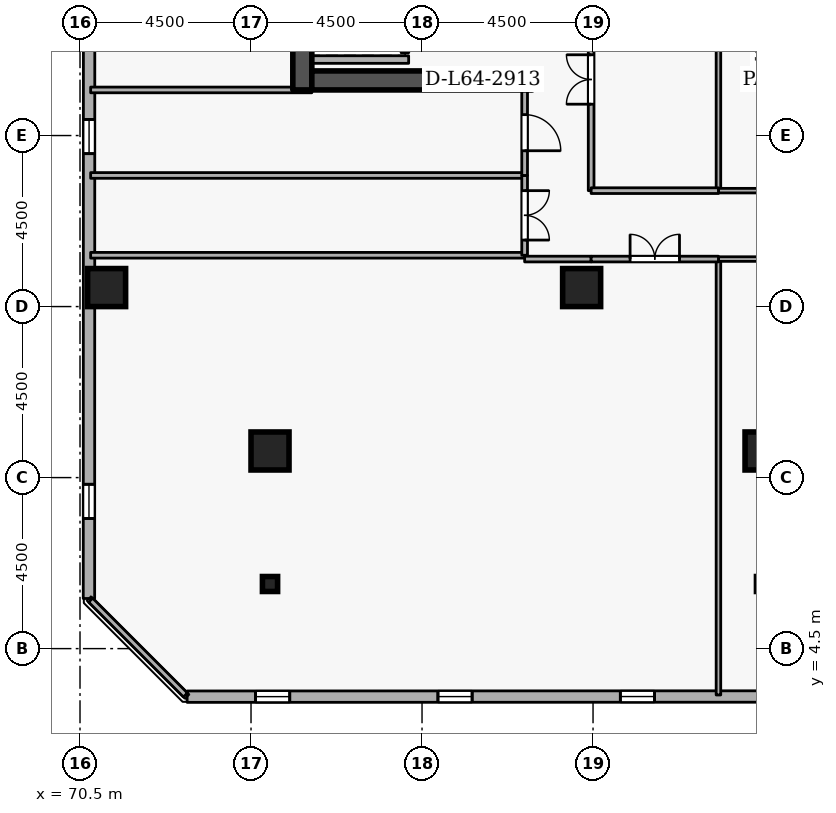
"""IFC4 building model, lengths in metres.
Left out: names, types, materials, properties, quantities, classifications, styles, units other than length and angle.
Written with IfcOpenShell. Run it as: python <this file> out.ifc"""

import sys

from ifc_helpers import new_model, si_unit, direction, frame, frame_2d, origin, origin_2d, place, context, subcontext, project, spatial, rectangle, i_section, extrude, element, fill, save


model = new_model("IFC4")
c1 = context("Model", 3, precision=1e-05, world=origin(), true_north=direction((0.0, 1.0)))
c2 = subcontext(c1, "Body", "Model", "MODEL_VIEW")
j1 = project(units=[si_unit("LENGTHUNIT", "METRE"), si_unit("PLANEANGLEUNIT", "RADIAN")], contexts=[c1])
p1 = place(None, origin())
s1 = spatial("IfcSite", under=j1, at=p1, CompositionType="ELEMENT")
p2 = place(p1, origin())
s2 = spatial("IfcBuilding", under=s1, at=p2, CompositionType="ELEMENT")
p3 = place(p2, frame((0.0, 0.0, 240.3)))
s3 = spatial("IfcBuildingStorey", under=s2, at=p3, CompositionType="ELEMENT", Elevation=240.3)
p4 = place(p3, frame((76.35, 19.2, 0.0), z_axis=(0.0, 0.0, 1.0), x_axis=(0.0, 1.0, 0.0)))
e1 = element("IfcWall", 1, at=p4, inside=s3, PredefinedType="SHEAR", context=c2, shape_type="SweptSolid", body=[
    extrude(rectangle(XDim=15.6, YDim=0.5, at=frame_2d((7.8, 0.0))), origin(), (0.0, 0.0, 1.0), 3.6),
])
p5 = place(p3, frame((76.6, 19.45, 0.0), z_axis=(0.0, 0.0, 1.0), x_axis=(1.0, 0.0, 0.0)))
e2 = element("IfcWall", 2, at=p5, inside=s3, PredefinedType="SHEAR", context=c2, shape_type="SweptSolid", body=[
    extrude(rectangle(XDim=5.8, YDim=0.5, at=frame_2d((2.9, 0.0))), origin(), (0.0, 0.0, 1.0), 3.6),
])
for number, where, z_axis, x_axis in (
    (3, (71.2, 14.0, 0.0), (0.0, 0.0, 1.0), (1.0, 0.0, 0.0)),
    (4, (88.5, 9.7, 0.0), (0.0, 0.0, 1.0), (1.0, 0.0, 0.0)),
    (5, (75.5, 9.7, 0.0), (0.0, 0.0, 1.0), (1.0, 0.0, 0.0)),
    (6, (83.7, 14.0, 0.0), (0.0, 0.0, 1.0), (1.0, 0.0, 0.0)),
):
    element("IfcColumn", number, at=place(p3, frame(where, z_axis=z_axis, x_axis=x_axis)), inside=s3, PredefinedType="COLUMN", context=c2, shape_type="SweptSolid", body=[
        extrude(rectangle(XDim=1.0, YDim=1.0, at=origin_2d()), origin(), (0.0, 0.0, 1.0), 3.6),
    ])
p6 = place(p3, frame((75.5, 6.2, 0.0), z_axis=(0.0, 0.0, 1.0), x_axis=(1.0, 0.0, 0.0)))
e7 = element("IfcColumn", 7, at=p6, inside=s3, PredefinedType="COLUMN", context=c2, shape_type="SweptSolid", body=[
    extrude(i_section(OverallWidth=0.399, OverallDepth=0.394, WebThickness=0.023, FlangeThickness=0.037, FilletRadius=0.015, at=origin_2d()), origin(), (0.0, 0.0, 1.0), 3.6),
])
p7 = place(p3, frame((73.319, 3.235, 0.0), z_axis=(0.0, 0.0, 1.0), x_axis=(0.999999963872, 0.000268805477, 0.0)))
e8 = element("IfcWall", 8, at=p7, inside=s3, PredefinedType="STANDARD", context=c2, shape_type="SweptSolid", body=[
    extrude(rectangle(XDim=33.605, YDim=0.3, at=frame_2d((16.802, 0.0))), origin(), (0.0, 0.0, 1.0), 2.7),
])
p8 = place(p7, frame((1.8, 0.0, 0.72)))
e9 = element("IfcOpeningElement", 9, at=p8, cuts=e8, PredefinedType="OPENING", context=c2, shape_type="SweptSolid", body=[
    extrude(rectangle(XDim=0.9, YDim=1.75, at=frame_2d((0.45, 0.875))), frame((0.0, 0.16, 0.0), z_axis=(0.0, -1.0, 0.0), x_axis=(1.0, 0.0, 0.0)), (0.0, 0.0, 1.0), 0.32),
])
p9 = place(p7, frame((6.6, 0.0, 0.72)))
e10 = element("IfcOpeningElement", 10, at=p9, cuts=e8, PredefinedType="OPENING", context=c2, shape_type="SweptSolid", body=[
    extrude(rectangle(XDim=0.9, YDim=1.75, at=frame_2d((0.45, 0.875))), frame((0.0, 0.16, 0.0), z_axis=(0.0, -1.0, 0.0), x_axis=(1.0, 0.0, 0.0)), (0.0, 0.0, 1.0), 0.32),
])
p10 = place(p7, frame((11.4, 0.0, 0.72)))
e11 = element("IfcOpeningElement", 11, at=p10, cuts=e8, PredefinedType="OPENING", context=c2, shape_type="SweptSolid", body=[
    extrude(rectangle(XDim=0.9, YDim=1.75, at=frame_2d((0.45, 0.875))), frame((0.0, 0.16, 0.0), z_axis=(0.0, -1.0, 0.0), x_axis=(1.0, 0.0, 0.0)), (0.0, 0.0, 1.0), 0.32),
])
p11 = place(p7, frame((16.2, 0.0, 0.72)))
e12 = element("IfcOpeningElement", 12, at=p11, cuts=e8, PredefinedType="OPENING", context=c2, shape_type="SweptSolid", body=[
    extrude(rectangle(XDim=0.9, YDim=1.75, at=frame_2d((0.45, 0.875))), frame((0.0, 0.16, 0.0), z_axis=(0.0, -1.0, 0.0), x_axis=(1.0, 0.0, 0.0)), (0.0, 0.0, 1.0), 0.32),
])
p12 = place(p7, frame((21.0, 0.0, 0.72)))
e13 = element("IfcOpeningElement", 13, at=p12, cuts=e8, PredefinedType="OPENING", context=c2, shape_type="SweptSolid", body=[
    extrude(rectangle(XDim=0.9, YDim=1.75, at=frame_2d((0.45, 0.875))), frame((0.0, 0.16, 0.0), z_axis=(0.0, -1.0, 0.0), x_axis=(1.0, 0.0, 0.0)), (0.0, 0.0, 1.0), 0.32),
])
p13 = place(p7, frame((25.8, 0.0, 0.72)))
e14 = element("IfcOpeningElement", 14, at=p13, cuts=e8, PredefinedType="OPENING", context=c2, shape_type="SweptSolid", body=[
    extrude(rectangle(XDim=0.9, YDim=1.75, at=frame_2d((0.45, 0.875))), frame((0.0, 0.16, 0.0), z_axis=(0.0, -1.0, 0.0), x_axis=(1.0, 0.0, 0.0)), (0.0, 0.0, 1.0), 0.32),
])
p14 = place(p7, frame((30.6, 0.0, 0.72)))
e15 = element("IfcOpeningElement", 15, at=p14, cuts=e8, PredefinedType="OPENING", context=c2, shape_type="SweptSolid", body=[
    extrude(rectangle(XDim=0.9, YDim=1.75, at=frame_2d((0.45, 0.875))), frame((0.0, 0.16, 0.0), z_axis=(0.0, -1.0, 0.0), x_axis=(1.0, 0.0, 0.0)), (0.0, 0.0, 1.0), 0.32),
])
p15 = place(p3, frame((70.744, 39.424, 0.0), z_axis=(0.0, 0.0, 1.0), x_axis=(-0.000268805477, -0.999999963872, 0.0)))
e16 = element("IfcWall", 16, at=p15, inside=s3, PredefinedType="STANDARD", context=c2, shape_type="SweptSolid", body=[
    extrude(rectangle(XDim=33.605, YDim=0.3, at=frame_2d((16.802, 0.0))), origin(), (0.0, 0.0, 1.0), 2.7),
])
p16 = place(p15, frame((6.6, 0.0, 0.72)))
e17 = element("IfcOpeningElement", 17, at=p16, cuts=e16, PredefinedType="OPENING", context=c2, shape_type="SweptSolid", body=[
    extrude(rectangle(XDim=0.9, YDim=1.75, at=frame_2d((0.45, 0.875))), frame((0.0, 0.16, 0.0), z_axis=(0.0, -1.0, 0.0), x_axis=(1.0, 0.0, 0.0)), (0.0, 0.0, 1.0), 0.32),
])
p17 = place(p15, frame((16.2, 0.0, 0.72)))
e18 = element("IfcOpeningElement", 18, at=p17, cuts=e16, PredefinedType="OPENING", context=c2, shape_type="SweptSolid", body=[
    extrude(rectangle(XDim=0.9, YDim=1.75, at=frame_2d((0.45, 0.875))), frame((0.0, 0.16, 0.0), z_axis=(0.0, -1.0, 0.0), x_axis=(1.0, 0.0, 0.0)), (0.0, 0.0, 1.0), 0.32),
])
p18 = place(p15, frame((21.0, 0.0, 0.72)))
e19 = element("IfcOpeningElement", 19, at=p18, cuts=e16, PredefinedType="OPENING", context=c2, shape_type="SweptSolid", body=[
    extrude(rectangle(XDim=0.9, YDim=1.75, at=frame_2d((0.45, 0.875))), frame((0.0, 0.16, 0.0), z_axis=(0.0, -1.0, 0.0), x_axis=(1.0, 0.0, 0.0)), (0.0, 0.0, 1.0), 0.32),
])
p19 = place(p15, frame((30.6, 0.0, 0.72)))
e20 = element("IfcOpeningElement", 20, at=p19, cuts=e16, PredefinedType="OPENING", context=c2, shape_type="SweptSolid", body=[
    extrude(rectangle(XDim=0.9, YDim=1.75, at=frame_2d((0.45, 0.875))), frame((0.0, 0.16, 0.0), z_axis=(0.0, -1.0, 0.0), x_axis=(1.0, 0.0, 0.0)), (0.0, 0.0, 1.0), 0.32),
])
p20 = place(p3, frame((79.05, 20.18, 0.0), z_axis=(0.0, 0.0, 1.0), x_axis=(0.0, 1.0, 0.0)))
e21 = element("IfcWall", 21, at=p20, inside=s3, PredefinedType="STANDARD", context=c2, shape_type="SweptSolid", body=[
    extrude(rectangle(XDim=1.94, YDim=0.2, at=frame_2d((0.97, 0.0))), origin(), (0.0, 0.0, 1.0), 3.34),
])
p21 = place(p20, frame((0.46, 0.0, 0.0)))
e22 = element("IfcOpeningElement", 22, at=p21, cuts=e21, PredefinedType="OPENING", context=c2, shape_type="SweptSolid", body=[
    extrude(rectangle(XDim=1.02, YDim=2.06, at=frame_2d((0.51, 1.03))), frame((0.0, 0.11, 0.0), z_axis=(0.0, -1.0, 0.0), x_axis=(1.0, 0.0, 0.0)), (0.0, 0.0, 1.0), 0.22),
])
p22 = place(p3, frame((76.612, 20.0, 0.0), z_axis=(0.0, 0.0, 1.0), x_axis=(1.0, 0.0, 0.0)))
e23 = element("IfcWall", 23, at=p22, inside=s3, PredefinedType="STANDARD", context=c2, shape_type="SweptSolid", body=[
    extrude(rectangle(XDim=2.536, YDim=0.2, at=frame_2d((1.268, 0.0))), origin(), (0.0, 0.0, 1.0), 3.34),
])
for number, where, z_axis, x_axis in (
    (24, (82.2, 14.85, 0.0), (0.0, 0.0, 1.0), (-1.0, 0.0, 0.0)),
    (25, (70.78, 16.95, 0.0), (0.0, 0.0, 1.0), (1.0, 0.0, 0.0)),
):
    element("IfcWall", number, at=place(p3, frame(where, z_axis=z_axis, x_axis=x_axis)), inside=s3, PredefinedType="PARTITIONING", context=c2, shape_type="SweptSolid", body=[
        extrude(rectangle(XDim=11.42, YDim=0.15, at=frame_2d((5.71, 0.0))), origin(), (0.0, 0.0, 1.0), 3.34),
    ])
p23 = place(p3, frame((82.2, 16.95, 0.0), z_axis=(0.0, 0.0, 1.0), x_axis=(0.0, -1.0, 0.0)))
e26 = element("IfcWall", 26, at=p23, inside=s3, PredefinedType="PARTITIONING", context=c2, shape_type="SweptSolid", body=[
    extrude(rectangle(XDim=2.1, YDim=0.15, at=frame_2d((1.05, 0.0))), origin(), (0.0, 0.0, 1.0), 3.34),
])
p24 = place(p23, frame((0.4, 0.0, 0.0)))
e27 = element("IfcOpeningElement", 27, at=p24, cuts=e26, PredefinedType="OPENING", context=c2, shape_type="SweptSolid", body=[
    extrude(rectangle(XDim=1.3, YDim=2.12, at=frame_2d((0.65, 1.06))), frame((0.0, 0.085, 0.0), z_axis=(0.0, -1.0, 0.0), x_axis=(1.0, 0.0, 0.0)), (0.0, 0.0, 1.0), 0.17),
])
p25 = place(p3, frame((70.78, 19.2, 0.0), z_axis=(0.0, 0.0, 1.0), x_axis=(1.0, 0.0, 0.0)))
e28 = element("IfcWall", 28, at=p25, inside=s3, PredefinedType="PARTITIONING", context=c2, shape_type="SweptSolid", body=[
    extrude(rectangle(XDim=5.82, YDim=0.15, at=frame_2d((2.91, 0.0))), origin(), (0.0, 0.0, 1.0), 2.545),
])
p26 = place(p3, frame((82.2, 19.2, 0.0), z_axis=(0.0, 0.0, 1.0), x_axis=(0.0, -1.0, 0.0)))
e29 = element("IfcWall", 29, at=p26, inside=s3, PredefinedType="PARTITIONING", context=c2, shape_type="SweptSolid", body=[
    extrude(rectangle(XDim=2.25, YDim=0.15, at=frame_2d((1.125, 0.0))), origin(), (0.0, 0.0, 1.0), 3.34),
])
p27 = place(p26, frame((0.65, 0.0, 0.0)))
e30 = element("IfcOpeningElement", 30, at=p27, cuts=e29, PredefinedType="OPENING", context=c2, shape_type="SweptSolid", body=[
    extrude(rectangle(XDim=0.95, YDim=2.1, at=frame_2d((0.475, 1.05))), frame((0.0, 0.085, 0.0), z_axis=(0.0, -1.0, 0.0), x_axis=(1.0, 0.0, 0.0)), (0.0, 0.0, 1.0), 0.17),
])
p28 = place(p3, frame((87.3, 3.28, 0.0), z_axis=(0.0, 0.0, 1.0), x_axis=(0.0, 1.0, 0.0)))
e31 = element("IfcWall", 31, at=p28, inside=s3, PredefinedType="PARTITIONING", context=c2, shape_type="SweptSolid", body=[
    extrude(rectangle(XDim=11.47, YDim=0.12, at=frame_2d((5.735, 0.0))), origin(), (0.0, 0.0, 1.0), 3.34),
])
p29 = place(p3, frame((87.3, 14.75, 0.0), z_axis=(0.0, 0.0, 1.0), x_axis=(1.0, 0.0, 0.0)))
e32 = element("IfcWall", 32, at=p29, inside=s3, PredefinedType="PARTITIONING", context=c2, shape_type="SweptSolid", body=[
    extrude(rectangle(XDim=5.75, YDim=0.12, at=frame_2d((2.875, 0.0))), origin(), (0.0, 0.0, 1.0), 3.34),
])
p30 = place(p29, frame((2.35, 0.0, 0.0)))
e33 = element("IfcOpeningElement", 33, at=p30, cuts=e32, PredefinedType="OPENING", context=c2, shape_type="SweptSolid", body=[
    extrude(rectangle(XDim=1.05, YDim=2.1, at=frame_2d((0.525, 1.05))), frame((0.0, 0.07, 0.0), z_axis=(0.0, -1.0, 0.0), x_axis=(1.0, 0.0, 0.0)), (0.0, 0.0, 1.0), 0.14),
])
p31 = place(p3, frame((73.275, 3.28, 0.0), z_axis=(0.0, 0.0, 1.0), x_axis=(-0.707106781187, 0.707106781187, 0.0)))
e34 = element("IfcWall", 34, at=p31, inside=s3, PredefinedType="PARTITIONING", context=c2, shape_type="SweptSolid", body=[
    extrude(rectangle(XDim=3.528, YDim=0.15, at=frame_2d((1.764, 0.0))), origin(), (0.0, 0.0, 1.0), 3.34),
])
p32 = place(p3, frame((82.2, 14.75, 0.0), z_axis=(0.0, 0.0, 1.0), x_axis=(1.0, 0.0, 0.0)))
e35 = element("IfcWall", 35, at=p32, inside=s3, PredefinedType="PARTITIONING", context=c2, shape_type="SweptSolid", body=[
    extrude(rectangle(XDim=1.75, YDim=0.15, at=frame_2d((0.875, 0.0))), origin(), (0.0, 0.0, 1.0), 3.34),
])
p33 = place(p3, frame((83.95, 14.75, 0.0), z_axis=(0.0, 0.0, 1.0), x_axis=(1.0, 0.0, 0.0)))
e36 = element("IfcWall", 36, at=p33, inside=s3, PredefinedType="PARTITIONING", context=c2, shape_type="SweptSolid", body=[
    extrude(rectangle(XDim=3.35, YDim=0.15, at=frame_2d((1.675, 0.0))), origin(), (0.0, 0.0, 1.0), 3.34),
])
p34 = place(p33, frame((1.025, 0.0, 0.0)))
e37 = element("IfcOpeningElement", 37, at=p34, cuts=e36, PredefinedType="OPENING", context=c2, shape_type="SweptSolid", body=[
    extrude(rectangle(XDim=1.3, YDim=2.12, at=frame_2d((0.65, 1.06))), frame((0.0, 0.085, 0.0), z_axis=(0.0, -1.0, 0.0), x_axis=(1.0, 0.0, 0.0)), (0.0, 0.0, 1.0), 0.17),
])
p35 = place(p3, frame((87.3, 16.55, 0.0), z_axis=(0.0, 0.0, 1.0), x_axis=(0.0, 1.0, 0.0)))
e38 = element("IfcWall", 38, at=p35, inside=s3, PredefinedType="PARTITIONING", context=c2, shape_type="SweptSolid", body=[
    extrude(rectangle(XDim=5.85, YDim=0.12, at=frame_2d((2.925, 0.0))), origin(), (0.0, 0.0, 1.0), 3.34),
])
p36 = place(p3, frame((93.05, 16.55, 0.0), z_axis=(0.0, 0.0, 1.0), x_axis=(-1.0, 0.0, 0.0)))
e39 = element("IfcWall", 39, at=p36, inside=s3, PredefinedType="PARTITIONING", context=c2, shape_type="SweptSolid", body=[
    extrude(rectangle(XDim=5.75, YDim=0.12, at=frame_2d((2.875, 0.0))), origin(), (0.0, 0.0, 1.0), 3.34),
])
p37 = place(p3, frame((83.95, 16.55, 0.0), z_axis=(0.0, 0.0, 1.0), x_axis=(0.0, 1.0, 0.0)))
e40 = element("IfcWall", 40, at=p37, inside=s3, PredefinedType="PARTITIONING", context=c2, shape_type="SweptSolid", body=[
    extrude(rectangle(XDim=5.85, YDim=0.15, at=frame_2d((2.925, 0.0))), origin(), (0.0, 0.0, 1.0), 3.34),
])
p38 = place(p37, frame((2.275, 0.0, 0.0)))
e41 = element("IfcOpeningElement", 41, at=p38, cuts=e40, PredefinedType="OPENING", context=c2, shape_type="SweptSolid", body=[
    extrude(rectangle(XDim=1.3, YDim=2.12, at=frame_2d((0.65, 1.06))), frame((0.0, 0.085, 0.0), z_axis=(0.0, -1.0, 0.0), x_axis=(1.0, 0.0, 0.0)), (0.0, 0.0, 1.0), 0.17),
])
p39 = place(p3, frame((87.3, 16.55, 0.0), z_axis=(0.0, 0.0, 1.0), x_axis=(-1.0, 0.0, 0.0)))
e42 = element("IfcWall", 42, at=p39, inside=s3, PredefinedType="PARTITIONING", context=c2, shape_type="SweptSolid", body=[
    extrude(rectangle(XDim=3.35, YDim=0.15, at=frame_2d((1.675, 0.0))), origin(), (0.0, 0.0, 1.0), 3.34),
])
p40 = place(p8, origin())
e43 = element("IfcWindow", 43, at=p40, inside=s3, PartitioningType="SINGLE_PANEL", PredefinedType="WINDOW", context=c2, shape_type="SweptSolid", body=[
    extrude(rectangle(XDim=0.9, YDim=1.75, at=frame_2d((0.45, 0.875))), frame((0.0, 0.03, 0.0), z_axis=(0.0, -1.0, 0.0), x_axis=(1.0, 0.0, 0.0)), (0.0, 0.0, 1.0), 0.06),
])
fill(e9, e43)
p41 = place(p9, origin())
e44 = element("IfcWindow", 44, at=p41, inside=s3, PartitioningType="SINGLE_PANEL", PredefinedType="WINDOW", context=c2, shape_type="SweptSolid", body=[
    extrude(rectangle(XDim=0.9, YDim=1.75, at=frame_2d((0.45, 0.875))), frame((0.0, 0.03, 0.0), z_axis=(0.0, -1.0, 0.0), x_axis=(1.0, 0.0, 0.0)), (0.0, 0.0, 1.0), 0.06),
])
fill(e10, e44)
p42 = place(p10, origin())
e45 = element("IfcWindow", 45, at=p42, inside=s3, PartitioningType="SINGLE_PANEL", PredefinedType="WINDOW", context=c2, shape_type="SweptSolid", body=[
    extrude(rectangle(XDim=0.9, YDim=1.75, at=frame_2d((0.45, 0.875))), frame((0.0, 0.03, 0.0), z_axis=(0.0, -1.0, 0.0), x_axis=(1.0, 0.0, 0.0)), (0.0, 0.0, 1.0), 0.06),
])
fill(e11, e45)
p43 = place(p18, origin())
e46 = element("IfcWindow", 46, at=p43, inside=s3, PartitioningType="SINGLE_PANEL", PredefinedType="WINDOW", context=c2, shape_type="SweptSolid", body=[
    extrude(rectangle(XDim=0.9, YDim=1.75, at=frame_2d((0.45, 0.875))), frame((0.0, 0.03, 0.0), z_axis=(0.0, -1.0, 0.0), x_axis=(1.0, 0.0, 0.0)), (0.0, 0.0, 1.0), 0.06),
])
fill(e19, e46)
p44 = place(p19, origin())
e47 = element("IfcWindow", 47, at=p44, inside=s3, PartitioningType="SINGLE_PANEL", PredefinedType="WINDOW", context=c2, shape_type="SweptSolid", body=[
    extrude(rectangle(XDim=0.9, YDim=1.75, at=frame_2d((0.45, 0.875))), frame((0.0, 0.03, 0.0), z_axis=(0.0, -1.0, 0.0), x_axis=(1.0, 0.0, 0.0)), (0.0, 0.0, 1.0), 0.06),
])
fill(e20, e47)
p45 = place(p24, origin())
e48 = element("IfcDoor", 48, at=p45, inside=s3, OperationType="DOUBLE_DOOR_SINGLE_SWING", PredefinedType="DOOR", context=c2, shape_type="SweptSolid", body=[
    extrude(rectangle(XDim=1.3, YDim=2.12, at=frame_2d((0.65, 1.06))), frame((0.0, 0.025, 0.0), z_axis=(0.0, -1.0, 0.0), x_axis=(1.0, 0.0, 0.0)), (0.0, 0.0, 1.0), 0.05),
])
fill(e27, e48)
p46 = place(p27, origin())
e49 = element("IfcDoor", 49, at=p46, inside=s3, OperationType="SINGLE_SWING_RIGHT", PredefinedType="DOOR", context=c2, shape_type="SweptSolid", body=[
    extrude(rectangle(XDim=0.95, YDim=2.1, at=frame_2d((0.475, 1.05))), frame((0.0, 0.025, 0.0), z_axis=(0.0, -1.0, 0.0), x_axis=(1.0, 0.0, 0.0)), (0.0, 0.0, 1.0), 0.05),
])
fill(e30, e49)
p47 = place(p34, origin())
e50 = element("IfcDoor", 50, at=p47, inside=s3, OperationType="DOUBLE_DOOR_SINGLE_SWING", PredefinedType="DOOR", context=c2, shape_type="SweptSolid", body=[
    extrude(rectangle(XDim=1.3, YDim=2.12, at=frame_2d((0.65, 1.06))), frame((0.0, 0.025, 0.0), z_axis=(0.0, -1.0, 0.0), x_axis=(1.0, 0.0, 0.0)), (0.0, 0.0, 1.0), 0.05),
])
fill(e37, e50)
p48 = place(p38, origin())
e51 = element("IfcDoor", 51, at=p48, inside=s3, OperationType="DOUBLE_DOOR_SINGLE_SWING", PredefinedType="DOOR", context=c2, shape_type="SweptSolid", body=[
    extrude(rectangle(XDim=1.3, YDim=2.12, at=frame_2d((0.65, 1.06))), frame((0.0, 0.025, 0.0), z_axis=(0.0, -1.0, 0.0), x_axis=(1.0, 0.0, 0.0)), (0.0, 0.0, 1.0), 0.05),
])
fill(e41, e51)
save(model, sys.argv[1])
